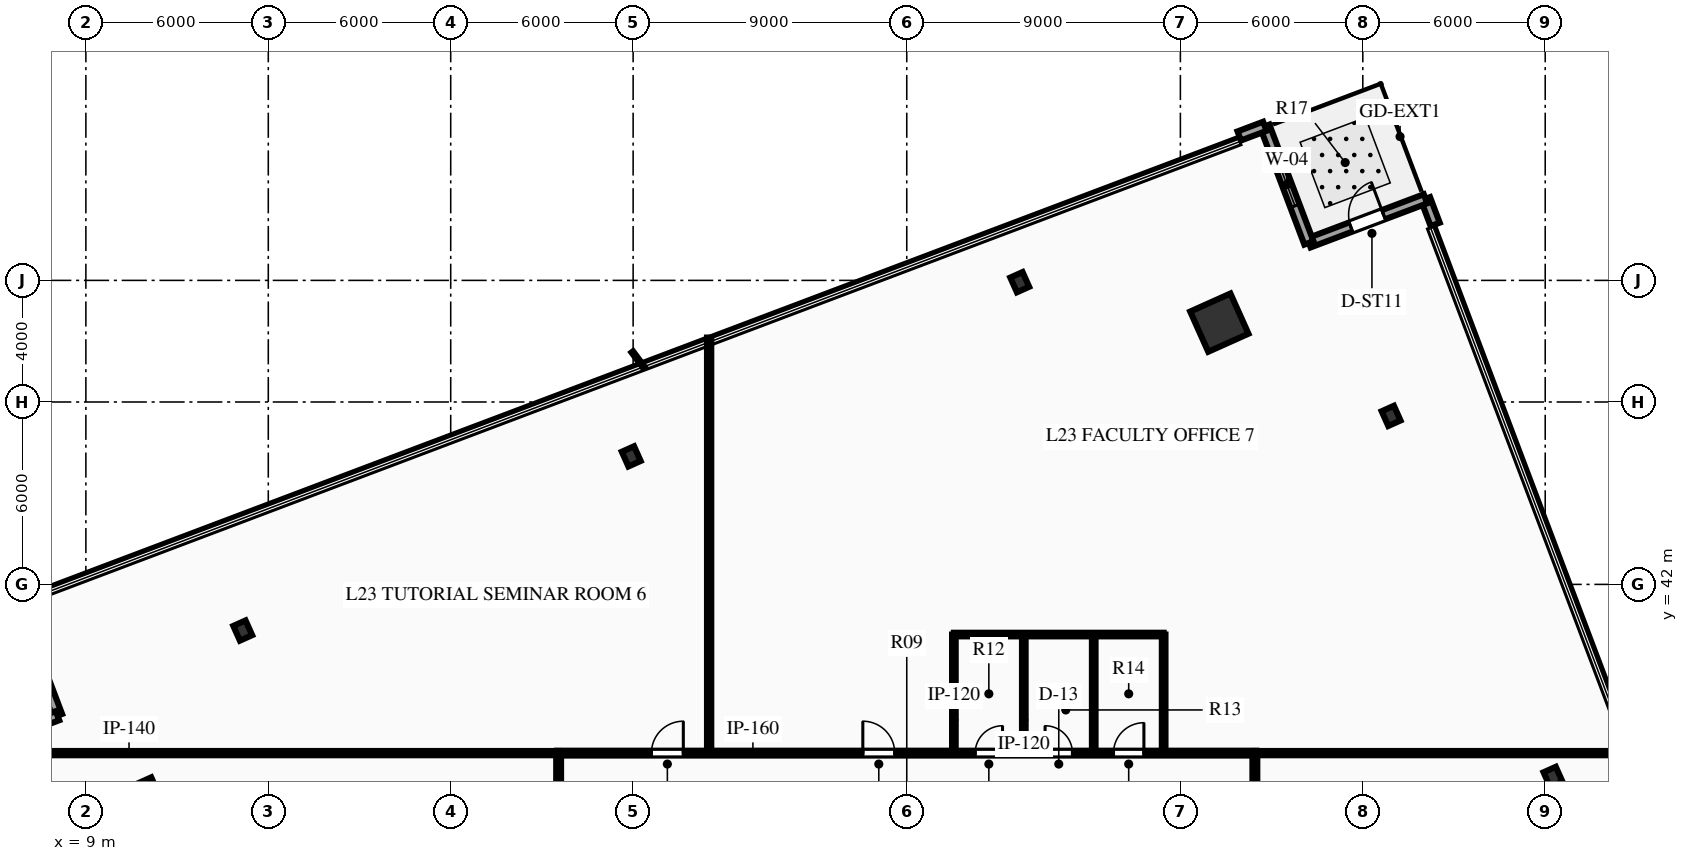
"""IFC4 building model, lengths in metres.
Left out: names, types, materials, properties, quantities, classifications, styles, units other than length and angle.
Written with IfcOpenShell. Run it as: python <this file> out.ifc"""

import sys

from ifc_helpers import new_model, si_unit, direction, frame, frame_2d, origin, origin_2d, place, context, subcontext, project, spatial, rectangle, hollow_rectangle, i_section, extrude, element, fill, save


model = new_model("IFC4")
c1 = context("Model", 3, precision=1e-05, world=origin(), true_north=direction((0.0, 1.0)))
c2 = subcontext(c1, "Body", "Model", "MODEL_VIEW")
j1 = project(units=[si_unit("LENGTHUNIT", "METRE"), si_unit("PLANEANGLEUNIT", "RADIAN")], contexts=[c1])
p1 = place(None, origin())
s1 = spatial("IfcSite", under=j1, at=p1, CompositionType="ELEMENT")
p2 = place(p1, origin())
s2 = spatial("IfcBuilding", under=s1, at=p2, CompositionType="ELEMENT")
p3 = place(p2, frame((0.0, 0.0, 97.95)))
s3 = spatial("IfcBuildingStorey", under=s2, at=p3, CompositionType="ELEMENT", Elevation=97.95)
for number, where, z_axis, x_axis in (
    (1, (46.281, 50.61, 0.0), (0.0, 0.0, 1.0), (0.912, 0.409, 0.0)),
    (2, (10.786, 34.695, 0.0), (0.0, 0.0, 1.0), (0.912, 0.409, 0.0)),
):
    element("IfcColumn", number, at=place(p3, frame(where, z_axis=z_axis, x_axis=x_axis)), inside=s3, PredefinedType="COLUMN", context=c2, shape_type="SweptSolid", body=[
        extrude(hollow_rectangle(XDim=1.45, YDim=1.45, WallThickness=0.07, at=origin_2d()), origin(), (0.0, 0.0, 1.0), 3.75),
    ])
for number, where, z_axis, x_axis in (
    (3, (57.255, 35.667, 0.0), (0.0, 0.0, 1.0), (0.912, 0.409, 0.0)),
    (4, (51.93, 47.543, 0.0), (0.0, 0.0, 1.0), (0.912, 0.409, 0.0)),
    (5, (39.716, 51.941, 0.0), (0.0, 0.0, 1.0), (0.912, 0.409, 0.0)),
    (6, (26.938, 46.211, 0.0), (0.0, 0.0, 1.0), (0.912, 0.409, 0.0)),
    (7, (14.159, 40.482, 0.0), (0.0, 0.0, 1.0), (0.912, 0.409, 0.0)),
):
    element("IfcColumn", number, at=place(p3, frame(where, z_axis=z_axis, x_axis=x_axis)), inside=s3, PredefinedType="COLUMN", context=c2, shape_type="SweptSolid", body=[
        extrude(i_section(OverallWidth=0.442, OverallDepth=0.531, WebThickness=0.066, FlangeThickness=0.106, at=origin_2d()), origin(), (0.0, 0.0, 1.0), 3.75),
    ])
p4 = place(p3, frame((53.063, 54.683, 0.0), z_axis=(0.0, 0.0, 1.0), x_axis=(0.353500808466, -0.93543421918, 0.0)))
e8 = element("IfcWall", 8, at=p4, inside=s3, PredefinedType="STANDARD", context=c2, shape_type="SweptSolid", body=[
    extrude(rectangle(XDim=0.9, YDim=0.32, at=frame_2d((0.45, 0.0))), origin(), (0.0, 0.0, 1.0), 3.45),
])
p5 = place(p3, frame((49.228, 53.234, 0.0), z_axis=(0.0, 0.0, 1.0), x_axis=(0.935442779556, 0.353478155162, 0.0)))
e9 = element("IfcWall", 9, at=p5, inside=s3, PredefinedType="STANDARD", context=c2, shape_type="SweptSolid", body=[
    extrude(rectangle(XDim=4.1, YDim=0.32, at=frame_2d((2.05, 0.0))), origin(), (0.0, 0.0, 1.0), 3.45),
])
p6 = place(p5, frame((1.475, 0.0, 0.0)))
e10 = element("IfcOpeningElement", 10, at=p6, cuts=e9, PredefinedType="OPENING", context=c2, shape_type="SweptSolid", body=[
    extrude(rectangle(XDim=1.15, YDim=2.2, at=frame_2d((0.575, 1.1))), frame((0.0, 0.17, 0.0), z_axis=(0.0, -1.0, 0.0), x_axis=(1.0, 0.0, 0.0)), (0.0, 0.0, 1.0), 0.34),
])
p7 = place(p3, frame((47.778, 57.069, 0.0), z_axis=(0.0, 0.0, 1.0), x_axis=(0.353458466055, -0.935450219292, 0.0)))
e11 = element("IfcWall", 11, at=p7, inside=s3, PredefinedType="STANDARD", context=c2, shape_type="SweptSolid", body=[
    extrude(rectangle(XDim=4.1, YDim=0.32, at=frame_2d((2.05, 0.0))), origin(), (0.0, 0.0, 1.0), 3.45),
])
p8 = place(p7, frame((1.3, 0.0, 0.85)))
e12 = element("IfcOpeningElement", 12, at=p8, cuts=e11, PredefinedType="OPENING", context=c2, shape_type="SweptSolid", body=[
    extrude(rectangle(XDim=1.5, YDim=2.1, at=frame_2d((0.75, 1.05))), frame((0.0, 0.17, 0.0), z_axis=(0.0, -1.0, 0.0), x_axis=(1.0, 0.0, 0.0)), (0.0, 0.0, 1.0), 0.34),
])
p9 = place(p3, frame((46.936, 56.751, 0.0), z_axis=(0.0, 0.0, 1.0), x_axis=(0.935468108396, 0.353411117785, 0.0)))
e13 = element("IfcWall", 13, at=p9, inside=s3, PredefinedType="STANDARD", context=c2, shape_type="SweptSolid", body=[
    extrude(rectangle(XDim=0.9, YDim=0.32, at=frame_2d((0.45, 0.0))), origin(), (0.0, 0.0, 1.0), 3.45),
])
p10 = place(p3, frame((8.068, 37.681, 0.0), z_axis=(0.0, 0.0, 1.0), x_axis=(-0.353530261365, 0.935423088393, 0.0)))
e14 = element("IfcWall", 14, at=p10, inside=s3, PredefinedType="STANDARD", context=c2, shape_type="SweptSolid", body=[
    extrude(rectangle(XDim=4.1, YDim=0.32, at=frame_2d((2.05, 0.0))), origin(), (0.0, 0.0, 1.0), 3.45),
])
p11 = place(p3, frame((4.233, 36.231, 0.0), z_axis=(0.0, 0.0, 1.0), x_axis=(0.935430530167, 0.353510570185, 0.0)))
e15 = element("IfcWall", 15, at=p11, inside=s3, PredefinedType="STANDARD", context=c2, shape_type="SweptSolid", body=[
    extrude(rectangle(XDim=4.1, YDim=0.32, at=frame_2d((2.05, 0.0))), origin(), (0.0, 0.0, 1.0), 3.45),
])
p12 = place(p3, frame((24.5, 36.45, 0.0), z_axis=(0.0, 0.0, 1.0), x_axis=(1.0, 0.0, 0.0)))
e16 = element("IfcWall", 16, at=p12, inside=s3, PredefinedType="PARTITIONING", context=c2, shape_type="SweptSolid", body=[
    extrude(rectangle(XDim=23.0, YDim=0.16, at=frame_2d((11.5, 0.0))), origin(), (0.0, 0.0, 1.0), 3.45),
])
p13 = place(p12, frame((13.75, 0.0, 0.0)))
e17 = element("IfcOpeningElement", 17, at=p13, cuts=e16, PredefinedType="OPENING", context=c2, shape_type="SweptSolid", body=[
    extrude(rectangle(XDim=0.9, YDim=2.15, at=frame_2d((0.45, 1.075))), frame((0.0, 0.09, 0.0), z_axis=(0.0, -1.0, 0.0), x_axis=(1.0, 0.0, 0.0)), (0.0, 0.0, 1.0), 0.18),
])
p14 = place(p12, frame((16.05, 0.0, 0.0)))
e18 = element("IfcOpeningElement", 18, at=p14, cuts=e16, PredefinedType="OPENING", context=c2, shape_type="SweptSolid", body=[
    extrude(rectangle(XDim=0.9, YDim=2.15, at=frame_2d((0.45, 1.075))), frame((0.0, 0.09, 0.0), z_axis=(0.0, -1.0, 0.0), x_axis=(1.0, 0.0, 0.0)), (0.0, 0.0, 1.0), 0.18),
])
p15 = place(p12, frame((18.3, 0.0, 0.0)))
e19 = element("IfcOpeningElement", 19, at=p15, cuts=e16, PredefinedType="OPENING", context=c2, shape_type="SweptSolid", body=[
    extrude(rectangle(XDim=1.0, YDim=2.15, at=frame_2d((0.5, 1.075))), frame((0.0, 0.09, 0.0), z_axis=(0.0, -1.0, 0.0), x_axis=(1.0, 0.0, 0.0)), (0.0, 0.0, 1.0), 0.18),
])
p16 = place(p12, frame((3.101, 0.0, 0.0)))
e20 = element("IfcOpeningElement", 20, at=p16, cuts=e16, PredefinedType="OPENING", context=c2, shape_type="SweptSolid", body=[
    extrude(rectangle(XDim=1.05, YDim=2.15, at=frame_2d((0.525, 1.075))), frame((0.0, 0.09, 0.0), z_axis=(0.0, -1.0, 0.0), x_axis=(1.0, 0.0, 0.0)), (0.0, 0.0, 1.0), 0.18),
])
p17 = place(p12, frame((10.055, 0.0, 0.0)))
e21 = element("IfcOpeningElement", 21, at=p17, cuts=e16, PredefinedType="OPENING", context=c2, shape_type="SweptSolid", body=[
    extrude(rectangle(XDim=1.05, YDim=2.15, at=frame_2d((0.525, 1.075))), frame((0.0, 0.09, 0.0), z_axis=(0.0, -1.0, 0.0), x_axis=(1.0, 0.0, 0.0)), (0.0, 0.0, 1.0), 0.18),
])
p18 = place(p3, frame((24.55, 15.55, 0.0), z_axis=(0.0, 0.0, 1.0), x_axis=(0.0, 1.0, 0.0)))
e22 = element("IfcWall", 22, at=p18, inside=s3, PredefinedType="PARTITIONING", context=c2, shape_type="SweptSolid", body=[
    extrude(rectangle(XDim=20.9, YDim=0.16, at=frame_2d((10.45, 0.0))), origin(), (0.0, 0.0, 1.0), 3.45),
])
p19 = place(p18, frame((5.107, 0.0, 0.0)))
e23 = element("IfcOpeningElement", 23, at=p19, cuts=e22, PredefinedType="OPENING", context=c2, shape_type="SweptSolid", body=[
    extrude(rectangle(XDim=1.05, YDim=2.15, at=frame_2d((0.525, 1.075))), frame((0.0, 0.09, 0.0), z_axis=(0.0, -1.0, 0.0), x_axis=(1.0, 0.0, 0.0)), (0.0, 0.0, 1.0), 0.18),
])
p20 = place(p18, frame((12.155, 0.0, 0.0)))
e24 = element("IfcOpeningElement", 24, at=p20, cuts=e22, PredefinedType="OPENING", context=c2, shape_type="SweptSolid", body=[
    extrude(rectangle(XDim=1.05, YDim=2.15, at=frame_2d((0.525, 1.075))), frame((0.0, 0.09, 0.0), z_axis=(0.0, -1.0, 0.0), x_axis=(1.0, 0.0, 0.0)), (0.0, 0.0, 1.0), 0.18),
])
p21 = place(p18, frame((16.443, 0.0, 0.0)))
e25 = element("IfcOpeningElement", 25, at=p21, cuts=e22, PredefinedType="OPENING", context=c2, shape_type="SweptSolid", body=[
    extrude(rectangle(XDim=1.05, YDim=2.15, at=frame_2d((0.525, 1.075))), frame((0.0, 0.09, 0.0), z_axis=(0.0, -1.0, 0.0), x_axis=(1.0, 0.0, 0.0)), (0.0, 0.0, 1.0), 0.18),
])
p22 = place(p3, frame((47.45, 15.55, 0.0), z_axis=(0.0, 0.0, 1.0), x_axis=(0.0, 1.0, 0.0)))
e26 = element("IfcWall", 26, at=p22, inside=s3, PredefinedType="PARTITIONING", context=c2, shape_type="SweptSolid", body=[
    extrude(rectangle(XDim=20.9, YDim=0.16, at=frame_2d((10.45, 0.0))), origin(), (0.0, 0.0, 1.0), 3.45),
])
p23 = place(p22, frame((7.417, 0.0, 0.0)))
e27 = element("IfcOpeningElement", 27, at=p23, cuts=e26, PredefinedType="OPENING", context=c2, shape_type="SweptSolid", body=[
    extrude(rectangle(XDim=1.05, YDim=2.15, at=frame_2d((0.525, 1.075))), frame((0.0, 0.09, 0.0), z_axis=(0.0, -1.0, 0.0), x_axis=(1.0, 0.0, 0.0)), (0.0, 0.0, 1.0), 0.18),
])
p24 = place(p3, frame((37.55, 36.45, 0.0), z_axis=(0.0, 0.0, 1.0), x_axis=(0.0, 1.0, 0.0)))
e28 = element("IfcWall", 28, at=p24, inside=s3, PredefinedType="PARTITIONING", context=c2, shape_type="SweptSolid", body=[
    extrude(rectangle(XDim=3.9, YDim=0.12, at=frame_2d((1.95, 0.0))), origin(), (0.0, 0.0, 1.0), 3.45),
])
p25 = place(p3, frame((39.85, 36.45, 0.0), z_axis=(0.0, 0.0, 1.0), x_axis=(0.0, 1.0, 0.0)))
e29 = element("IfcWall", 29, at=p25, inside=s3, PredefinedType="PARTITIONING", context=c2, shape_type="SweptSolid", body=[
    extrude(rectangle(XDim=3.9, YDim=0.12, at=frame_2d((1.95, 0.0))), origin(), (0.0, 0.0, 1.0), 2.749),
])
for number, where, z_axis, x_axis in (
    (30, (42.15, 36.45, 0.0), (0.0, 0.0, 1.0), (0.0, 1.0, 0.0)),
    (31, (44.45, 36.45, 0.0), (0.0, 0.0, 1.0), (0.0, 1.0, 0.0)),
):
    element("IfcWall", number, at=place(p3, frame(where, z_axis=z_axis, x_axis=x_axis)), inside=s3, PredefinedType="PARTITIONING", context=c2, shape_type="SweptSolid", body=[
        extrude(rectangle(XDim=3.9, YDim=0.12, at=frame_2d((1.95, 0.0))), origin(), (0.0, 0.0, 1.0), 3.45),
    ])
p26 = place(p3, frame((37.55, 40.35, 0.0), z_axis=(0.0, 0.0, 1.0), x_axis=(1.0, 0.0, 0.0)))
e32 = element("IfcWall", 32, at=p26, inside=s3, PredefinedType="PARTITIONING", context=c2, shape_type="SweptSolid", body=[
    extrude(rectangle(XDim=6.9, YDim=0.12, at=frame_2d((3.45, 0.0))), origin(), (0.0, 0.0, 1.0), 3.45),
])
p27 = place(p3, frame((4.924, 36.45, 0.0), z_axis=(0.0, 0.0, 1.0), x_axis=(1.0, 0.0, 0.0)))
e33 = element("IfcWall", 33, at=p27, inside=s3, PredefinedType="PARTITIONING", context=c2, shape_type="SweptSolid", body=[
    extrude(rectangle(XDim=19.626, YDim=0.14, at=frame_2d((9.813, 0.0))), origin(), (0.0, 0.0, 1.0), 3.45),
])
p28 = place(p3, frame((47.45, 36.45, 0.0), z_axis=(0.0, 0.0, 1.0), x_axis=(1.0, 0.0, 0.0)))
e34 = element("IfcWall", 34, at=p28, inside=s3, PredefinedType="PARTITIONING", context=c2, shape_type="SweptSolid", body=[
    extrude(rectangle(XDim=12.46, YDim=0.14, at=frame_2d((6.23, 0.0))), origin(), (0.0, 0.0, 1.0), 3.45),
])
p29 = place(p3, frame((29.5, 36.45, 0.0), z_axis=(0.0, 0.0, 1.0), x_axis=(0.0, 1.0, 0.0)))
e35 = element("IfcWall", 35, at=p29, inside=s3, PredefinedType="PARTITIONING", context=c2, shape_type="SweptSolid", body=[
    extrude(rectangle(XDim=13.669, YDim=0.14, at=frame_2d((6.835, 0.0))), origin(), (0.0, 0.0, 1.0), 3.45),
])
p30 = place(p6, origin())
e36 = element("IfcDoor", 36, at=p30, inside=s3, OperationType="SINGLE_SWING_RIGHT", PredefinedType="DOOR", context=c2, shape_type="SweptSolid", body=[
    extrude(rectangle(XDim=1.15, YDim=2.2, at=frame_2d((0.575, 1.1))), frame((0.0, 0.025, 0.0), z_axis=(0.0, -1.0, 0.0), x_axis=(1.0, 0.0, 0.0)), (0.0, 0.0, 1.0), 0.05),
])
fill(e10, e36)
p31 = place(p8, origin())
e37 = element("IfcWindow", 37, at=p31, inside=s3, PartitioningType="SINGLE_PANEL", PredefinedType="WINDOW", context=c2, shape_type="SweptSolid", body=[
    extrude(rectangle(XDim=1.5, YDim=2.1, at=frame_2d((0.75, 1.05))), frame((0.0, 0.03, 0.0), z_axis=(0.0, -1.0, 0.0), x_axis=(1.0, 0.0, 0.0)), (0.0, 0.0, 1.0), 0.06),
])
fill(e12, e37)
p32 = place(p13, origin())
e38 = element("IfcDoor", 38, at=p32, inside=s3, OperationType="SINGLE_SWING_RIGHT", PredefinedType="DOOR", context=c2, shape_type="SweptSolid", body=[
    extrude(rectangle(XDim=0.9, YDim=2.15, at=frame_2d((0.45, 1.075))), frame((0.0, 0.025, 0.0), z_axis=(0.0, -1.0, 0.0), x_axis=(1.0, 0.0, 0.0)), (0.0, 0.0, 1.0), 0.05),
])
fill(e17, e38)
p33 = place(p14, origin())
e39 = element("IfcDoor", 39, at=p33, inside=s3, OperationType="SINGLE_SWING_LEFT", PredefinedType="DOOR", context=c2, shape_type="SweptSolid", body=[
    extrude(rectangle(XDim=0.9, YDim=2.15, at=frame_2d((0.45, 1.075))), frame((0.0, 0.025, 0.0), z_axis=(0.0, -1.0, 0.0), x_axis=(1.0, 0.0, 0.0)), (0.0, 0.0, 1.0), 0.05),
])
fill(e18, e39)
p34 = place(p15, origin())
e40 = element("IfcDoor", 40, at=p34, inside=s3, OperationType="SINGLE_SWING_RIGHT", PredefinedType="DOOR", context=c2, shape_type="SweptSolid", body=[
    extrude(rectangle(XDim=1.0, YDim=2.15, at=frame_2d((0.5, 1.075))), frame((0.0, 0.025, 0.0), z_axis=(0.0, -1.0, 0.0), x_axis=(1.0, 0.0, 0.0)), (0.0, 0.0, 1.0), 0.05),
])
fill(e19, e40)
p35 = place(p16, origin())
e41 = element("IfcDoor", 41, at=p35, inside=s3, OperationType="SINGLE_SWING_RIGHT", PredefinedType="DOOR", context=c2, shape_type="SweptSolid", body=[
    extrude(rectangle(XDim=1.05, YDim=2.15, at=frame_2d((0.525, 1.075))), frame((0.0, 0.025, 0.0), z_axis=(0.0, -1.0, 0.0), x_axis=(1.0, 0.0, 0.0)), (0.0, 0.0, 1.0), 0.05),
])
fill(e20, e41)
p36 = place(p17, origin())
e42 = element("IfcDoor", 42, at=p36, inside=s3, OperationType="SINGLE_SWING_LEFT", PredefinedType="DOOR", context=c2, shape_type="SweptSolid", body=[
    extrude(rectangle(XDim=1.05, YDim=2.15, at=frame_2d((0.525, 1.075))), frame((0.0, 0.025, 0.0), z_axis=(0.0, -1.0, 0.0), x_axis=(1.0, 0.0, 0.0)), (0.0, 0.0, 1.0), 0.05),
])
fill(e21, e42)
save(model, sys.argv[1])
